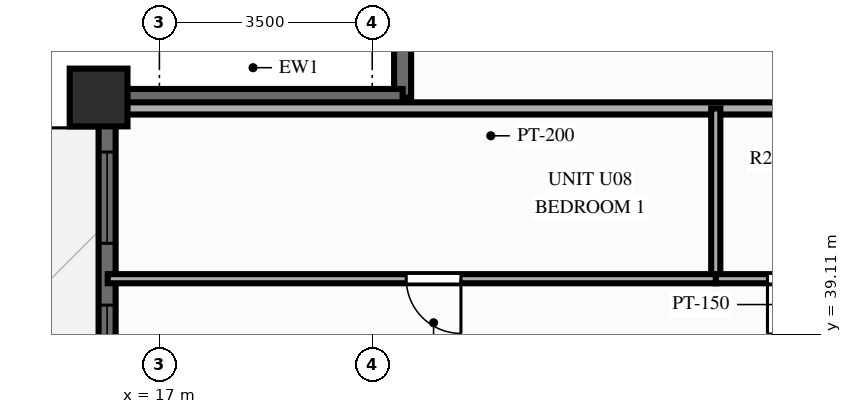
"""IFC4 building model, lengths in metres.
Left out: names, types, materials, properties, quantities, classifications, styles, units other than length and angle.
Written with IfcOpenShell. Run it as: python <this file> out.ifc"""

import sys

from ifc_helpers import new_model, si_unit, direction, frame, frame_2d, origin, origin_2d, place, context, subcontext, project, spatial, rectangle, extrude, source, transform, mapped, element, fill, save


model = new_model("IFC4")
c1 = context("Model", 3, precision=1e-05, world=origin(), true_north=direction((0.0, 1.0)))
c2 = subcontext(c1, "Body", "Model", "MODEL_VIEW")
j1 = project(units=[si_unit("LENGTHUNIT", "METRE"), si_unit("PLANEANGLEUNIT", "RADIAN")], contexts=[c1])
p1 = place(None, origin())
s1 = spatial("IfcSite", under=j1, at=p1, CompositionType="ELEMENT")
p2 = place(p1, origin())
s2 = spatial("IfcBuilding", under=s1, at=p2, CompositionType="ELEMENT")
p3 = place(p2, frame((0.0, 0.0, 159.1)))
s3 = spatial("IfcBuildingStorey", under=s2, at=p3, CompositionType="ELEMENT", Elevation=159.1)
m1 = source(origin(), c2, "Body", "SweptSolid", [
    extrude(rectangle(XDim=0.95, YDim=0.95, at=origin_2d()), origin(), (0.0, 0.0, 1.0), 3.9),
])
p4 = place(p3, frame((16.0, 43.0, 0.0), z_axis=(0.0, 0.0, 1.0), x_axis=(1.0, 0.0, 0.0)))
e1 = element("IfcColumn", 1, at=p4, inside=s3, PredefinedType="COLUMN", context=c2, shape_type="MappedRepresentation", body=[
    mapped(m1, transform((0.0, 0.0, 0.0), scale=1.0)),
])
p5 = place(p3, frame((16.14, 11.0, 0.0), z_axis=(0.0, 0.0, 1.0), x_axis=(0.0, 1.0, 0.0)))
e2 = element("IfcWall", 2, at=p5, inside=s3, PredefinedType="SOLIDWALL", context=c2, shape_type="SweptSolid", body=[
    extrude(rectangle(XDim=32.0, YDim=0.28, at=frame_2d((16.0, 0.0))), origin(), (0.0, 0.0, 1.0), 2.79),
])
p6 = place(p5, frame((0.748, 0.0, 0.85)))
e3 = element("IfcOpeningElement", 3, at=p6, cuts=e2, PredefinedType="OPENING", context=c2, shape_type="SweptSolid", body=[
    extrude(rectangle(XDim=1.2, YDim=1.5, at=frame_2d((0.6, 0.75))), frame((0.0, 0.152, 0.0), z_axis=(0.0, -1.0, 0.0), x_axis=(1.0, 0.0, 0.0)), (0.0, 0.0, 1.0), 0.304),
])
p7 = place(p5, frame((2.815, 0.0, 0.85)))
e4 = element("IfcOpeningElement", 4, at=p7, cuts=e2, PredefinedType="OPENING", context=c2, shape_type="SweptSolid", body=[
    extrude(rectangle(XDim=1.5, YDim=1.65, at=frame_2d((0.75, 0.825))), frame((0.0, 0.152, 0.0), z_axis=(0.0, -1.0, 0.0), x_axis=(1.0, 0.0, 0.0)), (0.0, 0.0, 1.0), 0.304),
])
p8 = place(p5, frame((5.117, 0.0, 0.85)))
e5 = element("IfcOpeningElement", 5, at=p8, cuts=e2, PredefinedType="OPENING", context=c2, shape_type="SweptSolid", body=[
    extrude(rectangle(XDim=1.2, YDim=1.5, at=frame_2d((0.6, 0.75))), frame((0.0, 0.152, 0.0), z_axis=(0.0, -1.0, 0.0), x_axis=(1.0, 0.0, 0.0)), (0.0, 0.0, 1.0), 0.304),
])
p9 = place(p5, frame((8.05, 0.0, 0.85)))
e6 = element("IfcOpeningElement", 6, at=p9, cuts=e2, PredefinedType="OPENING", context=c2, shape_type="SweptSolid", body=[
    extrude(rectangle(XDim=1.2, YDim=1.5, at=frame_2d((0.6, 0.75))), frame((0.0, 0.152, 0.0), z_axis=(0.0, -1.0, 0.0), x_axis=(1.0, 0.0, 0.0)), (0.0, 0.0, 1.0), 0.304),
])
p10 = place(p5, frame((10.185, 0.0, 0.85)))
e7 = element("IfcOpeningElement", 7, at=p10, cuts=e2, PredefinedType="OPENING", context=c2, shape_type="SweptSolid", body=[
    extrude(rectangle(XDim=1.5, YDim=1.65, at=frame_2d((0.75, 0.825))), frame((0.0, 0.152, 0.0), z_axis=(0.0, -1.0, 0.0), x_axis=(1.0, 0.0, 0.0)), (0.0, 0.0, 1.0), 0.304),
])
p11 = place(p5, frame((12.72, 0.0, 0.0)))
e8 = element("IfcOpeningElement", 8, at=p11, cuts=e2, PredefinedType="OPENING", context=c2, shape_type="SweptSolid", body=[
    extrude(rectangle(XDim=1.6, YDim=2.15, at=frame_2d((0.8, 1.075))), frame((0.0, 0.152, 0.0), z_axis=(0.0, -1.0, 0.0), x_axis=(1.0, 0.0, 0.0)), (0.0, 0.0, 1.0), 0.304),
])
p12 = place(p5, frame((15.4, 0.0, 0.85)))
e9 = element("IfcOpeningElement", 9, at=p12, cuts=e2, PredefinedType="OPENING", context=c2, shape_type="SweptSolid", body=[
    extrude(rectangle(XDim=1.2, YDim=1.5, at=frame_2d((0.6, 0.75))), frame((0.0, 0.152, 0.0), z_axis=(0.0, -1.0, 0.0), x_axis=(1.0, 0.0, 0.0)), (0.0, 0.0, 1.0), 0.304),
])
p13 = place(p5, frame((17.58, 0.0, 0.85)))
e10 = element("IfcOpeningElement", 10, at=p13, cuts=e2, PredefinedType="OPENING", context=c2, shape_type="SweptSolid", body=[
    extrude(rectangle(XDim=1.2, YDim=1.5, at=frame_2d((0.6, 0.75))), frame((0.0, 0.152, 0.0), z_axis=(0.0, -1.0, 0.0), x_axis=(1.0, 0.0, 0.0)), (0.0, 0.0, 1.0), 0.304),
])
p14 = place(p5, frame((19.715, 0.0, 0.85)))
e11 = element("IfcOpeningElement", 11, at=p14, cuts=e2, PredefinedType="OPENING", context=c2, shape_type="SweptSolid", body=[
    extrude(rectangle(XDim=1.5, YDim=1.65, at=frame_2d((0.75, 0.825))), frame((0.0, 0.152, 0.0), z_axis=(0.0, -1.0, 0.0), x_axis=(1.0, 0.0, 0.0)), (0.0, 0.0, 1.0), 0.304),
])
p15 = place(p5, frame((22.15, 0.0, 0.85)))
e12 = element("IfcOpeningElement", 12, at=p15, cuts=e2, PredefinedType="OPENING", context=c2, shape_type="SweptSolid", body=[
    extrude(rectangle(XDim=1.8, YDim=1.65, at=frame_2d((0.9, 0.825))), frame((0.0, 0.152, 0.0), z_axis=(0.0, -1.0, 0.0), x_axis=(1.0, 0.0, 0.0)), (0.0, 0.0, 1.0), 0.304),
])
p16 = place(p5, frame((25.633, 0.0, 0.85)))
e13 = element("IfcOpeningElement", 13, at=p16, cuts=e2, PredefinedType="OPENING", context=c2, shape_type="SweptSolid", body=[
    extrude(rectangle(XDim=0.7, YDim=1.5, at=frame_2d((0.35, 0.75))), frame((0.0, 0.152, 0.0), z_axis=(0.0, -1.0, 0.0), x_axis=(1.0, 0.0, 0.0)), (0.0, 0.0, 1.0), 0.304),
])
p17 = place(p5, frame((27.085, 0.0, 0.85)))
e14 = element("IfcOpeningElement", 14, at=p17, cuts=e2, PredefinedType="OPENING", context=c2, shape_type="SweptSolid", body=[
    extrude(rectangle(XDim=1.5, YDim=1.65, at=frame_2d((0.75, 0.825))), frame((0.0, 0.152, 0.0), z_axis=(0.0, -1.0, 0.0), x_axis=(1.0, 0.0, 0.0)), (0.0, 0.0, 1.0), 0.304),
])
p18 = place(p5, frame((29.602, 0.0, 0.85)))
e15 = element("IfcOpeningElement", 15, at=p18, cuts=e2, PredefinedType="OPENING", context=c2, shape_type="SweptSolid", body=[
    extrude(rectangle(XDim=1.5, YDim=1.65, at=frame_2d((0.75, 0.825))), frame((0.0, 0.152, 0.0), z_axis=(0.0, -1.0, 0.0), x_axis=(1.0, 0.0, 0.0)), (0.0, 0.0, 1.0), 0.304),
])
for number, where, z_axis, x_axis in (
    (16, (21.0, 43.0, 0.0), (0.0, 0.0, 1.0), (0.0, 1.0, 0.0)),
    (17, (16.08, 43.0, 0.0), (0.0, 0.0, 1.0), (1.0, 0.0, 0.0)),
):
    element("IfcWall", number, at=place(p3, frame(where, z_axis=z_axis, x_axis=x_axis)), inside=s3, PredefinedType="SOLIDWALL", context=c2, shape_type="SweptSolid", body=[
        extrude(rectangle(XDim=4.92, YDim=0.28, at=frame_2d((2.46, 0.0))), origin(), (0.0, 0.0, 1.0), 2.79),
    ])
p19 = place(p3, frame((28.75, 42.82, 0.0), z_axis=(0.0, 0.0, 1.0), x_axis=(-1.0, 0.0, 0.0)))
e18 = element("IfcWall", 18, at=p19, inside=s3, PredefinedType="PARTITIONING", context=c2, shape_type="SweptSolid", body=[
    extrude(rectangle(XDim=12.6, YDim=0.2, at=frame_2d((6.3, 0.0))), origin(), (0.0, 0.0, 1.0), 3.69),
])
p20 = place(p3, frame((26.15, 40.019, 0.0), z_axis=(0.0, 0.0, 1.0), x_axis=(0.0, 1.0, 0.0)))
e19 = element("IfcWall", 19, at=p20, inside=s3, PredefinedType="PARTITIONING", context=c2, shape_type="SweptSolid", body=[
    extrude(rectangle(XDim=2.801, YDim=0.15, at=frame_2d((1.4, 0.0))), origin(), (0.0, 0.0, 1.0), 3.69),
])
p21 = place(p3, frame((28.75, 40.019, 0.0), z_axis=(0.0, 0.0, 1.0), x_axis=(-1.0, 0.0, 0.0)))
e20 = element("IfcWall", 20, at=p21, inside=s3, PredefinedType="PARTITIONING", context=c2, shape_type="SweptSolid", body=[
    extrude(rectangle(XDim=2.6, YDim=0.15, at=frame_2d((1.3, 0.0))), origin(), (0.0, 0.0, 1.0), 3.69),
])
p22 = place(p21, frame((0.85, 0.0, 0.0)))
e21 = element("IfcOpeningElement", 21, at=p22, cuts=e20, PredefinedType="OPENING", context=c2, shape_type="SweptSolid", body=[
    extrude(rectangle(XDim=0.9, YDim=2.1, at=frame_2d((0.45, 1.05))), frame((0.0, 0.087, 0.0), z_axis=(0.0, -1.0, 0.0), x_axis=(1.0, 0.0, 0.0)), (0.0, 0.0, 1.0), 0.174),
])
p23 = place(p3, frame((26.15, 40.019, 0.0), z_axis=(0.0, 0.0, 1.0), x_axis=(-1.0, 0.0, 0.0)))
e22 = element("IfcWall", 22, at=p23, inside=s3, PredefinedType="PARTITIONING", context=c2, shape_type="SweptSolid", body=[
    extrude(rectangle(XDim=10.0, YDim=0.15, at=frame_2d((5.0, 0.0))), origin(), (0.0, 0.0, 1.0), 3.69),
])
p24 = place(p23, frame((4.191, 0.0, 0.0)))
e23 = element("IfcOpeningElement", 23, at=p24, cuts=e22, PredefinedType="OPENING", context=c2, shape_type="SweptSolid", body=[
    extrude(rectangle(XDim=0.9, YDim=2.1, at=frame_2d((0.45, 1.05))), frame((0.0, 0.087, 0.0), z_axis=(0.0, -1.0, 0.0), x_axis=(1.0, 0.0, 0.0)), (0.0, 0.0, 1.0), 0.174),
])
m2 = source(origin(), c2, "Body", "SweptSolid", [
    extrude(rectangle(XDim=1.5, YDim=1.65, at=frame_2d((0.75, 0.825))), frame((0.0, 0.03, 0.0), z_axis=(0.0, -1.0, 0.0), x_axis=(1.0, 0.0, 0.0)), (0.0, 0.0, 1.0), 0.06),
])
p25 = place(p17, origin())
e24 = element("IfcWindow", 24, at=p25, inside=s3, PartitioningType="SINGLE_PANEL", PredefinedType="WINDOW", context=c2, shape_type="MappedRepresentation", body=[
    mapped(m2, transform((0.0, 0.0, 0.0), scale=1.0)),
])
fill(e14, e24)
p26 = place(p18, origin())
e25 = element("IfcWindow", 25, at=p26, inside=s3, PartitioningType="SINGLE_PANEL", PredefinedType="WINDOW", context=c2, shape_type="MappedRepresentation", body=[
    mapped(m2, transform((0.0, 0.0, 0.0), scale=1.0)),
])
fill(e15, e25)
m3 = source(origin(), c2, "Body", "SweptSolid", [
    extrude(rectangle(XDim=0.9, YDim=2.1, at=frame_2d((0.45, 1.05))), frame((0.0, 0.025, 0.0), z_axis=(0.0, -1.0, 0.0), x_axis=(1.0, 0.0, 0.0)), (0.0, 0.0, 1.0), 0.05),
])
p27 = place(p22, origin())
e26 = element("IfcDoor", 26, at=p27, inside=s3, OperationType="SINGLE_SWING_RIGHT", PredefinedType="DOOR", context=c2, shape_type="MappedRepresentation", body=[
    mapped(m3, transform((0.0, 0.0, 0.0), scale=1.0)),
])
fill(e21, e26)
p28 = place(p24, origin())
e27 = element("IfcDoor", 27, at=p28, inside=s3, OperationType="SINGLE_SWING_LEFT", PredefinedType="DOOR", context=c2, shape_type="MappedRepresentation", body=[
    mapped(m3, transform((0.0, 0.0, 0.0), scale=1.0)),
])
fill(e23, e27)
save(model, sys.argv[1])
